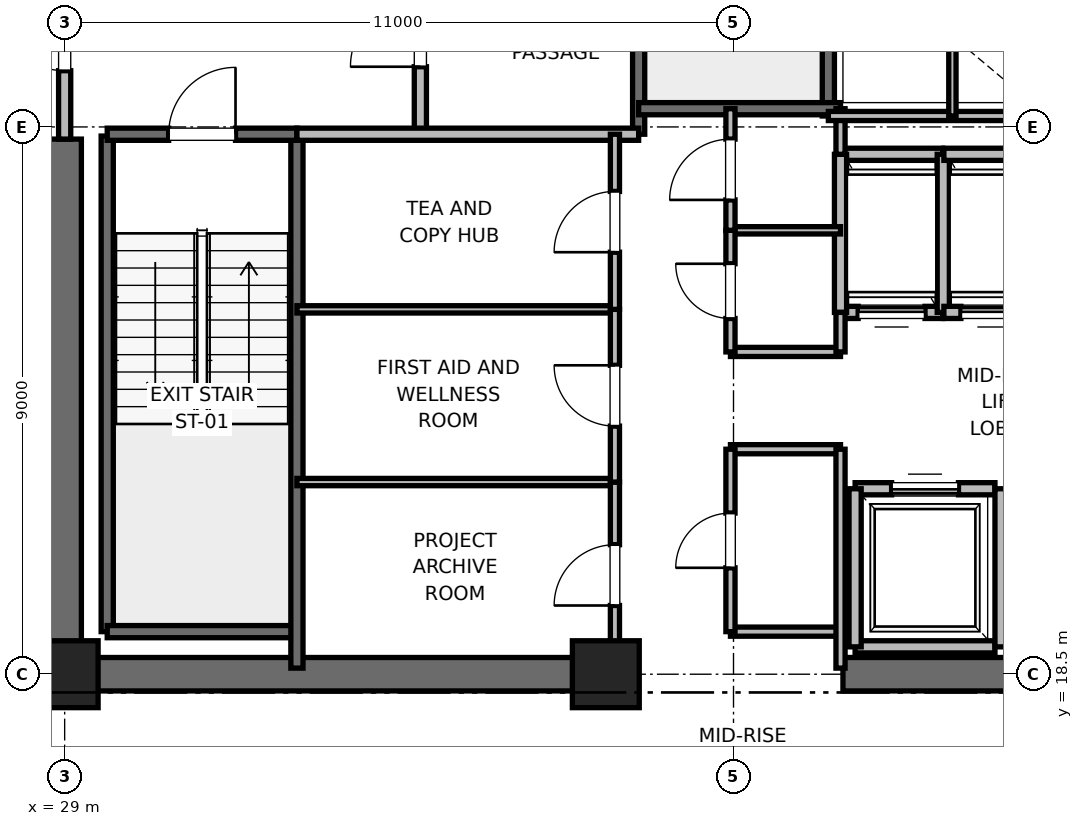
"""IFC4 building model, lengths in metres.
Left out: names, types, materials, properties, quantities, classifications, styles, units other than length and angle.
Written with IfcOpenShell. Run it as: python <this file> out.ifc"""

import sys

from ifc_helpers import new_model, si_unit, direction, frame, frame_2d, origin, origin_2d, place, context, subcontext, project, spatial, rectangle, extrude, element, fill, save


model = new_model("IFC4")
c1 = context("Model", 3, precision=1e-05, world=origin(), true_north=direction((0.0, 1.0)))
c2 = subcontext(c1, "Body", "Model", "MODEL_VIEW")
j1 = project(units=[si_unit("LENGTHUNIT", "METRE"), si_unit("PLANEANGLEUNIT", "RADIAN")], contexts=[c1])
p1 = place(None, origin())
s1 = spatial("IfcSite", under=j1, at=p1, CompositionType="ELEMENT")
p2 = place(p1, origin())
s2 = spatial("IfcBuilding", under=s1, at=p2, CompositionType="ELEMENT")
p3 = place(p2, frame((0.0, 0.0, 136.4)))
s3 = spatial("IfcBuildingStorey", under=s2, at=p3, CompositionType="ELEMENT", Elevation=136.4)
for number, where, z_axis, x_axis in (
    (1, (29.0, 18.5, 0.0), (0.0, 0.0, 1.0), (1.0, 0.0, 0.0)),
    (2, (37.9, 18.5, 0.0), (0.0, 0.0, 1.0), (1.0, 0.0, 0.0)),
):
    element("IfcColumn", number, at=place(p3, frame(where, z_axis=z_axis, x_axis=x_axis)), inside=s3, PredefinedType="PILASTER", context=c2, shape_type="SweptSolid", body=[
        extrude(rectangle(XDim=1.1, YDim=1.1, at=origin_2d()), origin(), (0.0, 0.0, 1.0), 4.0),
    ])
for number, where, z_axis, x_axis in (
    (3, (29.0, 18.5, 0.0), (0.0, 0.0, 1.0), (1.0, 0.0, 0.0)),
    (4, (41.8, 18.5, 0.0), (0.0, 0.0, 1.0), (1.0, 0.0, 0.0)),
):
    element("IfcWall", number, at=place(p3, frame(where, z_axis=z_axis, x_axis=x_axis)), inside=s3, PredefinedType="SHEAR", context=c2, shape_type="SweptSolid", body=[
        extrude(rectangle(XDim=9.2, YDim=0.55, at=frame_2d((4.6, 0.0))), origin(), (0.0, 0.0, 1.0), 3.775),
    ])
p4 = place(p3, frame((29.0, 18.5, 0.0), z_axis=(0.0, 0.0, 1.0), x_axis=(0.0, 1.0, 0.0)))
e5 = element("IfcWall", 5, at=p4, inside=s3, PredefinedType="SHEAR", context=c2, shape_type="SweptSolid", body=[
    extrude(rectangle(XDim=8.8, YDim=0.55, at=frame_2d((4.4, 0.0))), origin(), (0.0, 0.0, 1.0), 3.775),
])
p5 = place(p3, frame((29.7, 19.2, 0.0), z_axis=(0.0, 0.0, 1.0), x_axis=(0.0, 1.0, 0.0)))
e6 = element("IfcWall", 6, at=p5, inside=s3, PredefinedType="SOLIDWALL", context=c2, shape_type="SweptSolid", body=[
    extrude(rectangle(XDim=8.15, YDim=0.2, at=frame_2d((4.075, 0.0))), origin(), (0.0, 0.0, 1.0), 3.775),
])
p6 = place(p3, frame((29.7, 19.2, 0.0), z_axis=(0.0, 0.0, 1.0), x_axis=(1.0, 0.0, 0.0)))
e7 = element("IfcWall", 7, at=p6, inside=s3, PredefinedType="SOLIDWALL", context=c2, shape_type="SweptSolid", body=[
    extrude(rectangle(XDim=3.12, YDim=0.2, at=frame_2d((1.56, 0.0))), origin(), (0.0, 0.0, 1.0), 3.775),
])
p7 = place(p3, frame((32.82, 18.6, 0.0), z_axis=(0.0, 0.0, 1.0), x_axis=(0.0, 1.0, 0.0)))
e8 = element("IfcWall", 8, at=p7, inside=s3, PredefinedType="SOLIDWALL", context=c2, shape_type="SweptSolid", body=[
    extrude(rectangle(XDim=8.78, YDim=0.2, at=frame_2d((4.39, 0.0))), origin(), (0.0, 0.0, 1.0), 3.775),
])
p8 = place(p3, frame((29.7, 27.38, 0.0), z_axis=(0.0, 0.0, 1.0), x_axis=(1.0, 0.0, 0.0)))
e9 = element("IfcWall", 9, at=p8, inside=s3, PredefinedType="SOLIDWALL", context=c2, shape_type="SweptSolid", body=[
    extrude(rectangle(XDim=3.12, YDim=0.2, at=frame_2d((1.56, 0.0))), origin(), (0.0, 0.0, 1.0), 3.775),
])
p9 = place(p8, frame((1.01, 0.0, 0.0)))
e10 = element("IfcOpeningElement", 10, at=p9, cuts=e9, PredefinedType="OPENING", context=c2, shape_type="SweptSolid", body=[
    extrude(rectangle(XDim=1.1, YDim=2.15, at=frame_2d((0.55, 1.075))), frame((0.0, 0.1, 0.0), z_axis=(0.0, -1.0, 0.0), x_axis=(1.0, 0.0, 0.0)), (0.0, 0.0, 1.0), 0.2),
])
p10 = place(p3, frame((38.44, 27.38, 0.0), z_axis=(0.0, 0.0, 1.0), x_axis=(0.0, 1.0, 0.0)))
e11 = element("IfcWall", 11, at=p10, inside=s3, PredefinedType="SOLIDWALL", context=c2, shape_type="SweptSolid", body=[
    extrude(rectangle(XDim=8.87, YDim=0.2, at=frame_2d((4.435, 0.0))), origin(), (0.0, 0.0, 1.0), 3.775),
])
p11 = place(p3, frame((41.56, 27.68, 0.0), z_axis=(0.0, 0.0, 1.0), x_axis=(0.0, 1.0, 0.0)))
e12 = element("IfcWall", 12, at=p11, inside=s3, PredefinedType="SOLIDWALL", context=c2, shape_type="SweptSolid", body=[
    extrude(rectangle(XDim=8.57, YDim=0.2, at=frame_2d((4.285, 0.0))), origin(), (0.0, 0.0, 1.0), 3.775),
])
p12 = place(p3, frame((38.44, 27.8, 0.0), z_axis=(0.0, 0.0, 1.0), x_axis=(1.0, 0.0, 0.0)))
e13 = element("IfcWall", 13, at=p12, inside=s3, PredefinedType="SOLIDWALL", context=c2, shape_type="SweptSolid", body=[
    extrude(rectangle(XDim=3.32, YDim=0.2, at=frame_2d((1.66, 0.0))), origin(), (0.0, 0.0, 1.0), 3.775),
])
p13 = place(p3, frame((34.85, 27.38, 0.0), z_axis=(0.0, 0.0, 1.0), x_axis=(0.0, 1.0, 0.0)))
e14 = element("IfcWall", 14, at=p13, inside=s3, PredefinedType="PARTITIONING", context=c2, shape_type="SweptSolid", body=[
    extrude(rectangle(XDim=3.37, YDim=0.2, at=frame_2d((1.685, 0.0))), origin(), (0.0, 0.0, 1.0), 3.775),
])
p14 = place(p13, frame((1.11, 0.0, 0.0)))
e15 = element("IfcOpeningElement", 15, at=p14, cuts=e14, PredefinedType="OPENING", context=c2, shape_type="SweptSolid", body=[
    extrude(rectangle(XDim=1.15, YDim=2.2, at=frame_2d((0.575, 1.1))), frame((0.0, 0.1, 0.0), z_axis=(0.0, -1.0, 0.0), x_axis=(1.0, 0.0, 0.0)), (0.0, 0.0, 1.0), 0.2),
])
p15 = place(p3, frame((29.0, 27.3, 0.0), z_axis=(0.0, 0.0, 1.0), x_axis=(0.0, 1.0, 0.0)))
e16 = element("IfcWall", 16, at=p15, inside=s3, PredefinedType="PARTITIONING", context=c2, shape_type="SweptSolid", body=[
    extrude(rectangle(XDim=3.4, YDim=0.2, at=frame_2d((1.7, 0.0))), origin(), (0.0, 0.0, 1.0), 2.755),
])
p16 = place(p15, frame((1.125, 0.0, 0.0)))
e17 = element("IfcOpeningElement", 17, at=p16, cuts=e16, PredefinedType="OPENING", context=c2, shape_type="SweptSolid", body=[
    extrude(rectangle(XDim=1.15, YDim=2.2, at=frame_2d((0.575, 1.1))), frame((0.0, 0.1, 0.0), z_axis=(0.0, -1.0, 0.0), x_axis=(1.0, 0.0, 0.0)), (0.0, 0.0, 1.0), 0.2),
])
p17 = place(p3, frame((32.82, 27.38, 0.0), z_axis=(0.0, 0.0, 1.0), x_axis=(1.0, 0.0, 0.0)))
e18 = element("IfcWall", 18, at=p17, inside=s3, PredefinedType="PARTITIONING", context=c2, shape_type="SweptSolid", body=[
    extrude(rectangle(XDim=5.62, YDim=0.2, at=frame_2d((2.81, 0.0))), origin(), (0.0, 0.0, 1.0), 3.775),
])
p18 = place(p3, frame((42.0, 18.95, 0.0), z_axis=(0.0, 0.0, 1.0), x_axis=(1.0, 0.0, 0.0)))
e19 = element("IfcWall", 19, at=p18, inside=s3, PredefinedType="SOLIDWALL", context=c2, shape_type="SweptSolid", body=[
    extrude(rectangle(XDim=2.3, YDim=0.2, at=frame_2d((1.15, 0.0))), origin(), (0.0, 0.0, 1.0), 2.755),
])
p19 = place(p3, frame((44.3, 21.55, 0.0), z_axis=(0.0, 0.0, 1.0), x_axis=(-1.0, 0.0, 0.0)))
e20 = element("IfcWall", 20, at=p19, inside=s3, PredefinedType="SOLIDWALL", context=c2, shape_type="SweptSolid", body=[
    extrude(rectangle(XDim=2.3, YDim=0.2, at=frame_2d((1.15, 0.0))), origin(), (0.0, 0.0, 1.0), 3.775),
])
p20 = place(p19, frame((0.6, 0.0, 0.0)))
e21 = element("IfcOpeningElement", 21, at=p20, cuts=e20, PredefinedType="OPENING", context=c2, shape_type="SweptSolid", body=[
    extrude(rectangle(XDim=1.1, YDim=2.2, at=frame_2d((0.55, 1.1))), frame((0.0, 0.1, 0.0), z_axis=(0.0, -1.0, 0.0), x_axis=(1.0, 0.0, 0.0)), (0.0, 0.0, 1.0), 0.2),
])
p21 = place(p3, frame((42.0, 21.55, 0.0), z_axis=(0.0, 0.0, 1.0), x_axis=(0.0, -1.0, 0.0)))
e22 = element("IfcWall", 22, at=p21, inside=s3, PredefinedType="SOLIDWALL", context=c2, shape_type="SweptSolid", body=[
    extrude(rectangle(XDim=2.6, YDim=0.2, at=frame_2d((1.3, 0.0))), origin(), (0.0, 0.0, 1.0), 2.755),
])
p22 = place(p3, frame((44.4, 18.95, 0.0), z_axis=(0.0, 0.0, 1.0), x_axis=(0.0, 1.0, 0.0)))
e23 = element("IfcWall", 23, at=p22, inside=s3, PredefinedType="SOLIDWALL", context=c2, shape_type="SweptSolid", body=[
    extrude(rectangle(XDim=2.6, YDim=0.2, at=frame_2d((1.3, 0.0))), origin(), (0.0, 0.0, 1.0), 3.775),
])
p23 = place(p3, frame((41.76, 24.45, 0.0), z_axis=(0.0, 0.0, 1.0), x_axis=(1.0, 0.0, 0.0)))
e24 = element("IfcWall", 24, at=p23, inside=s3, PredefinedType="SOLIDWALL", context=c2, shape_type="SweptSolid", body=[
    extrude(rectangle(XDim=1.68, YDim=0.2, at=frame_2d((0.84, 0.0))), origin(), (0.0, 0.0, 1.0), 3.775),
])
p24 = place(p23, frame((0.29, 0.0, 0.0)))
e25 = element("IfcOpeningElement", 25, at=p24, cuts=e24, PredefinedType="OPENING", context=c2, shape_type="SweptSolid", body=[
    extrude(rectangle(XDim=1.1, YDim=2.2, at=frame_2d((0.55, 1.1))), frame((0.0, 0.1, 0.0), z_axis=(0.0, -1.0, 0.0), x_axis=(1.0, 0.0, 0.0)), (0.0, 0.0, 1.0), 0.2),
])
p25 = place(p3, frame((43.44, 27.05, 0.0), z_axis=(0.0, 0.0, 1.0), x_axis=(-1.0, 0.0, 0.0)))
e26 = element("IfcWall", 26, at=p25, inside=s3, PredefinedType="SOLIDWALL", context=c2, shape_type="SweptSolid", body=[
    extrude(rectangle(XDim=1.68, YDim=0.2, at=frame_2d((0.84, 0.0))), origin(), (0.0, 0.0, 1.0), 3.775),
])
for number, where, z_axis, x_axis in (
    (27, (41.76, 27.05, 0.0), (0.0, 0.0, 1.0), (0.0, -1.0, 0.0)),
    (28, (43.45, 24.45, 0.0), (0.0, 0.0, 1.0), (0.0, 1.0, 0.0)),
):
    element("IfcWall", number, at=place(p3, frame(where, z_axis=z_axis, x_axis=x_axis)), inside=s3, PredefinedType="SOLIDWALL", context=c2, shape_type="SweptSolid", body=[
        extrude(rectangle(XDim=2.6, YDim=0.2, at=frame_2d((1.3, 0.0))), origin(), (0.0, 0.0, 1.0), 3.775),
    ])
p26 = place(p3, frame((43.46, 24.45, 0.0), z_axis=(0.0, 0.0, 1.0), x_axis=(1.0, 0.0, 0.0)))
e29 = element("IfcWall", 29, at=p26, inside=s3, PredefinedType="SOLIDWALL", context=c2, shape_type="SweptSolid", body=[
    extrude(rectangle(XDim=1.66, YDim=0.2, at=frame_2d((0.83, 0.0))), origin(), (0.0, 0.0, 1.0), 3.775),
])
p27 = place(p26, frame((0.28, 0.0, 0.0)))
e30 = element("IfcOpeningElement", 30, at=p27, cuts=e29, PredefinedType="OPENING", context=c2, shape_type="SweptSolid", body=[
    extrude(rectangle(XDim=1.1, YDim=2.2, at=frame_2d((0.55, 1.1))), frame((0.0, 0.1, 0.0), z_axis=(0.0, -1.0, 0.0), x_axis=(1.0, 0.0, 0.0)), (0.0, 0.0, 1.0), 0.2),
])
p28 = place(p3, frame((45.12, 27.05, 0.0), z_axis=(0.0, 0.0, 1.0), x_axis=(-1.0, 0.0, 0.0)))
e31 = element("IfcWall", 31, at=p28, inside=s3, PredefinedType="SOLIDWALL", context=c2, shape_type="SweptSolid", body=[
    extrude(rectangle(XDim=1.66, YDim=0.2, at=frame_2d((0.83, 0.0))), origin(), (0.0, 0.0, 1.0), 3.775),
])
for number, where, z_axis, x_axis in (
    (32, (39.95, 19.2, 0.0), (0.0, 0.0, 1.0), (1.0, 0.0, 0.0)),
    (33, (39.95, 22.2, 0.0), (0.0, 0.0, 1.0), (1.0, 0.0, 0.0)),
    (34, (39.95, 23.8, 0.0), (0.0, 0.0, 1.0), (1.0, 0.0, 0.0)),
):
    element("IfcWall", number, at=place(p3, frame(where, z_axis=z_axis, x_axis=x_axis)), inside=s3, PredefinedType="PARTITIONING", context=c2, shape_type="SweptSolid", body=[
        extrude(rectangle(XDim=1.81, YDim=0.15, at=frame_2d((0.905, 0.0))), origin(), (0.0, 0.0, 1.0), 2.85),
    ])
p29 = place(p3, frame((39.95, 25.8, 0.0), z_axis=(0.0, 0.0, 1.0), x_axis=(1.0, 0.0, 0.0)))
e35 = element("IfcWall", 35, at=p29, inside=s3, PredefinedType="PARTITIONING", context=c2, shape_type="SweptSolid", body=[
    extrude(rectangle(XDim=1.81, YDim=0.12, at=frame_2d((0.905, 0.0))), origin(), (0.0, 0.0, 1.0), 2.85),
])
p30 = place(p3, frame((41.76, 18.6, 0.0), z_axis=(0.0, 0.0, 1.0), x_axis=(0.0, 1.0, 0.0)))
e36 = element("IfcWall", 36, at=p30, inside=s3, PredefinedType="PARTITIONING", context=c2, shape_type="SweptSolid", body=[
    extrude(rectangle(XDim=3.6, YDim=0.15, at=frame_2d((1.8, 0.0))), origin(), (0.0, 0.0, 1.0), 2.755),
])
p31 = place(p3, frame((41.76, 23.8, 0.0), z_axis=(0.0, 0.0, 1.0), x_axis=(0.0, 1.0, 0.0)))
e37 = element("IfcWall", 37, at=p31, inside=s3, PredefinedType="PARTITIONING", context=c2, shape_type="SweptSolid", body=[
    extrude(rectangle(XDim=0.65, YDim=0.15, at=frame_2d((0.325, 0.0))), origin(), (0.0, 0.0, 1.0), 2.85),
])
p32 = place(p3, frame((41.76, 27.05, 0.0), z_axis=(0.0, 0.0, 1.0), x_axis=(0.0, 1.0, 0.0)))
e38 = element("IfcWall", 38, at=p32, inside=s3, PredefinedType="PARTITIONING", context=c2, shape_type="SweptSolid", body=[
    extrude(rectangle(XDim=0.75, YDim=0.15, at=frame_2d((0.375, 0.0))), origin(), (0.0, 0.0, 1.0), 2.85),
])
p33 = place(p3, frame((39.95, 19.2, 0.0), z_axis=(0.0, 0.0, 1.0), x_axis=(0.0, 1.0, 0.0)))
e39 = element("IfcWall", 39, at=p33, inside=s3, PredefinedType="PARTITIONING", context=c2, shape_type="SweptSolid", body=[
    extrude(rectangle(XDim=3.0, YDim=0.15, at=frame_2d((1.5, 0.0))), origin(), (0.0, 0.0, 1.0), 2.85),
])
p34 = place(p33, frame((1.05, 0.0, 0.0)))
e40 = element("IfcOpeningElement", 40, at=p34, cuts=e39, PredefinedType="OPENING", context=c2, shape_type="SweptSolid", body=[
    extrude(rectangle(XDim=0.9, YDim=2.1, at=frame_2d((0.45, 1.05))), frame((0.0, 0.075, 0.0), z_axis=(0.0, -1.0, 0.0), x_axis=(1.0, 0.0, 0.0)), (0.0, 0.0, 1.0), 0.15),
])
p35 = place(p3, frame((39.95, 23.8, 0.0), z_axis=(0.0, 0.0, 1.0), x_axis=(0.0, 1.0, 0.0)))
e41 = element("IfcWall", 41, at=p35, inside=s3, PredefinedType="PARTITIONING", context=c2, shape_type="SweptSolid", body=[
    extrude(rectangle(XDim=2.0, YDim=0.15, at=frame_2d((1.0, 0.0))), origin(), (0.0, 0.0, 1.0), 2.85),
])
p36 = place(p35, frame((0.55, 0.0, 0.0)))
e42 = element("IfcOpeningElement", 42, at=p36, cuts=e41, PredefinedType="OPENING", context=c2, shape_type="SweptSolid", body=[
    extrude(rectangle(XDim=0.9, YDim=2.1, at=frame_2d((0.45, 1.05))), frame((0.0, 0.075, 0.0), z_axis=(0.0, -1.0, 0.0), x_axis=(1.0, 0.0, 0.0)), (0.0, 0.0, 1.0), 0.15),
])
p37 = place(p3, frame((39.95, 25.8, 0.0), z_axis=(0.0, 0.0, 1.0), x_axis=(0.0, 1.0, 0.0)))
e43 = element("IfcWall", 43, at=p37, inside=s3, PredefinedType="PARTITIONING", context=c2, shape_type="SweptSolid", body=[
    extrude(rectangle(XDim=2.0, YDim=0.15, at=frame_2d((1.0, 0.0))), origin(), (0.0, 0.0, 1.0), 2.85),
])
p38 = place(p37, frame((0.5, 0.0, 0.0)))
e44 = element("IfcOpeningElement", 44, at=p38, cuts=e43, PredefinedType="OPENING", context=c2, shape_type="SweptSolid", body=[
    extrude(rectangle(XDim=1.0, YDim=2.15, at=frame_2d((0.5, 1.075))), frame((0.0, 0.075, 0.0), z_axis=(0.0, -1.0, 0.0), x_axis=(1.0, 0.0, 0.0)), (0.0, 0.0, 1.0), 0.15),
])
for number, where, z_axis, x_axis in (
    (45, (32.82, 21.66, 0.0), (0.0, 0.0, 1.0), (1.0, 0.0, 0.0)),
    (46, (32.82, 24.5, 0.0), (0.0, 0.0, 1.0), (1.0, 0.0, 0.0)),
):
    element("IfcWall", number, at=place(p3, frame(where, z_axis=z_axis, x_axis=x_axis)), inside=s3, PredefinedType="PARTITIONING", context=c2, shape_type="SweptSolid", body=[
        extrude(rectangle(XDim=5.23, YDim=0.12, at=frame_2d((2.615, 0.0))), origin(), (0.0, 0.0, 1.0), 2.85),
    ])
p39 = place(p3, frame((38.05, 18.6, 0.0), z_axis=(0.0, 0.0, 1.0), x_axis=(0.0, 1.0, 0.0)))
e47 = element("IfcWall", 47, at=p39, inside=s3, PredefinedType="PARTITIONING", context=c2, shape_type="SweptSolid", body=[
    extrude(rectangle(XDim=3.06, YDim=0.15, at=frame_2d((1.53, 0.0))), origin(), (0.0, 0.0, 1.0), 2.755),
])
p40 = place(p39, frame((1.03, 0.0, 0.0)))
e48 = element("IfcOpeningElement", 48, at=p40, cuts=e47, PredefinedType="OPENING", context=c2, shape_type="SweptSolid", body=[
    extrude(rectangle(XDim=1.0, YDim=2.15, at=frame_2d((0.5, 1.075))), frame((0.0, 0.075, 0.0), z_axis=(0.0, -1.0, 0.0), x_axis=(1.0, 0.0, 0.0)), (0.0, 0.0, 1.0), 0.15),
])
p41 = place(p3, frame((38.05, 21.66, 0.0), z_axis=(0.0, 0.0, 1.0), x_axis=(0.0, 1.0, 0.0)))
e49 = element("IfcWall", 49, at=p41, inside=s3, PredefinedType="PARTITIONING", context=c2, shape_type="SweptSolid", body=[
    extrude(rectangle(XDim=2.84, YDim=0.15, at=frame_2d((1.42, 0.0))), origin(), (0.0, 0.0, 1.0), 2.85),
])
p42 = place(p41, frame((0.92, 0.0, 0.0)))
e50 = element("IfcOpeningElement", 50, at=p42, cuts=e49, PredefinedType="OPENING", context=c2, shape_type="SweptSolid", body=[
    extrude(rectangle(XDim=1.0, YDim=2.15, at=frame_2d((0.5, 1.075))), frame((0.0, 0.075, 0.0), z_axis=(0.0, -1.0, 0.0), x_axis=(1.0, 0.0, 0.0)), (0.0, 0.0, 1.0), 0.15),
])
p43 = place(p3, frame((38.05, 24.5, 0.0), z_axis=(0.0, 0.0, 1.0), x_axis=(0.0, 1.0, 0.0)))
e51 = element("IfcWall", 51, at=p43, inside=s3, PredefinedType="PARTITIONING", context=c2, shape_type="SweptSolid", body=[
    extrude(rectangle(XDim=2.88, YDim=0.15, at=frame_2d((1.44, 0.0))), origin(), (0.0, 0.0, 1.0), 2.85),
])
p44 = place(p43, frame((0.94, 0.0, 0.0)))
e52 = element("IfcOpeningElement", 52, at=p44, cuts=e51, PredefinedType="OPENING", context=c2, shape_type="SweptSolid", body=[
    extrude(rectangle(XDim=1.0, YDim=2.15, at=frame_2d((0.5, 1.075))), frame((0.0, 0.075, 0.0), z_axis=(0.0, -1.0, 0.0), x_axis=(1.0, 0.0, 0.0)), (0.0, 0.0, 1.0), 0.15),
])
p45 = place(p3, frame((41.56, 27.68, 0.0), z_axis=(0.0, 0.0, 1.0), x_axis=(1.0, 0.0, 0.0)))
e53 = element("IfcWall", 53, at=p45, inside=s3, PredefinedType="PARTITIONING", context=c2, shape_type="SweptSolid", body=[
    extrude(rectangle(XDim=3.59, YDim=0.15, at=frame_2d((1.795, 0.0))), origin(), (0.0, 0.0, 1.0), 2.85),
])
p46 = place(p3, frame((43.6, 27.68, 0.0), z_axis=(0.0, 0.0, 1.0), x_axis=(0.0, 1.0, 0.0)))
e54 = element("IfcWall", 54, at=p46, inside=s3, PredefinedType="PARTITIONING", context=c2, shape_type="SweptSolid", body=[
    extrude(rectangle(XDim=3.04, YDim=0.12, at=frame_2d((1.52, 0.0))), origin(), (0.0, 0.0, 1.0), 2.85),
])
p47 = place(p9, origin())
e55 = element("IfcDoor", 55, at=p47, inside=s3, OperationType="SINGLE_SWING_RIGHT", PredefinedType="DOOR", context=c2, shape_type="SweptSolid", body=[
    extrude(rectangle(XDim=1.1, YDim=2.15, at=frame_2d((0.55, 1.075))), frame((0.0, 0.025, 0.0), z_axis=(0.0, -1.0, 0.0), x_axis=(1.0, 0.0, 0.0)), (0.0, 0.0, 1.0), 0.05),
])
fill(e10, e55)
p48 = place(p14, origin())
e56 = element("IfcDoor", 56, at=p48, inside=s3, OperationType="SINGLE_SWING_LEFT", PredefinedType="DOOR", context=c2, shape_type="SweptSolid", body=[
    extrude(rectangle(XDim=1.15, YDim=2.2, at=frame_2d((0.575, 1.1))), frame((0.0, 0.025, 0.0), z_axis=(0.0, -1.0, 0.0), x_axis=(1.0, 0.0, 0.0)), (0.0, 0.0, 1.0), 0.05),
])
fill(e15, e56)
p49 = place(p16, origin())
e57 = element("IfcDoor", 57, at=p49, inside=s3, OperationType="SINGLE_SWING_RIGHT", PredefinedType="DOOR", context=c2, shape_type="SweptSolid", body=[
    extrude(rectangle(XDim=1.15, YDim=2.2, at=frame_2d((0.575, 1.1))), frame((0.0, 0.025, 0.0), z_axis=(0.0, -1.0, 0.0), x_axis=(1.0, 0.0, 0.0)), (0.0, 0.0, 1.0), 0.05),
])
fill(e17, e57)
p50 = place(p20, origin())
e58 = element("IfcDoor", 58, at=p50, inside=s3, OperationType="SLIDING_TO_RIGHT", PredefinedType="DOOR", context=c2, shape_type="SweptSolid", body=[
    extrude(rectangle(XDim=1.1, YDim=2.2, at=frame_2d((0.55, 1.1))), frame((0.0, 0.025, 0.0), z_axis=(0.0, -1.0, 0.0), x_axis=(1.0, 0.0, 0.0)), (0.0, 0.0, 1.0), 0.05),
])
fill(e21, e58)
p51 = place(p24, origin())
e59 = element("IfcDoor", 59, at=p51, inside=s3, OperationType="SLIDING_TO_RIGHT", PredefinedType="DOOR", context=c2, shape_type="SweptSolid", body=[
    extrude(rectangle(XDim=1.1, YDim=2.2, at=frame_2d((0.55, 1.1))), frame((0.0, 0.025, 0.0), z_axis=(0.0, -1.0, 0.0), x_axis=(1.0, 0.0, 0.0)), (0.0, 0.0, 1.0), 0.05),
])
fill(e25, e59)
p52 = place(p27, origin())
e60 = element("IfcDoor", 60, at=p52, inside=s3, OperationType="SLIDING_TO_RIGHT", PredefinedType="DOOR", context=c2, shape_type="SweptSolid", body=[
    extrude(rectangle(XDim=1.1, YDim=2.2, at=frame_2d((0.55, 1.1))), frame((0.0, 0.025, 0.0), z_axis=(0.0, -1.0, 0.0), x_axis=(1.0, 0.0, 0.0)), (0.0, 0.0, 1.0), 0.05),
])
fill(e30, e60)
p53 = place(p34, origin())
e61 = element("IfcDoor", 61, at=p53, inside=s3, OperationType="SINGLE_SWING_LEFT", PredefinedType="DOOR", context=c2, shape_type="SweptSolid", body=[
    extrude(rectangle(XDim=0.9, YDim=2.1, at=frame_2d((0.45, 1.05))), frame((0.0, 0.025, 0.0), z_axis=(0.0, -1.0, 0.0), x_axis=(1.0, 0.0, 0.0)), (0.0, 0.0, 1.0), 0.05),
])
fill(e40, e61)
p54 = place(p36, origin())
e62 = element("IfcDoor", 62, at=p54, inside=s3, OperationType="SINGLE_SWING_RIGHT", PredefinedType="DOOR", context=c2, shape_type="SweptSolid", body=[
    extrude(rectangle(XDim=0.9, YDim=2.1, at=frame_2d((0.45, 1.05))), frame((0.0, 0.025, 0.0), z_axis=(0.0, -1.0, 0.0), x_axis=(1.0, 0.0, 0.0)), (0.0, 0.0, 1.0), 0.05),
])
fill(e42, e62)
p55 = place(p38, origin())
e63 = element("IfcDoor", 63, at=p55, inside=s3, OperationType="SINGLE_SWING_LEFT", PredefinedType="DOOR", context=c2, shape_type="SweptSolid", body=[
    extrude(rectangle(XDim=1.0, YDim=2.15, at=frame_2d((0.5, 1.075))), frame((0.0, 0.025, 0.0), z_axis=(0.0, -1.0, 0.0), x_axis=(1.0, 0.0, 0.0)), (0.0, 0.0, 1.0), 0.05),
])
fill(e44, e63)
p56 = place(p40, origin())
e64 = element("IfcDoor", 64, at=p56, inside=s3, OperationType="SINGLE_SWING_LEFT", PredefinedType="DOOR", context=c2, shape_type="SweptSolid", body=[
    extrude(rectangle(XDim=1.0, YDim=2.15, at=frame_2d((0.5, 1.075))), frame((0.0, 0.025, 0.0), z_axis=(0.0, -1.0, 0.0), x_axis=(1.0, 0.0, 0.0)), (0.0, 0.0, 1.0), 0.05),
])
fill(e48, e64)
p57 = place(p42, origin())
e65 = element("IfcDoor", 65, at=p57, inside=s3, OperationType="SINGLE_SWING_RIGHT", PredefinedType="DOOR", context=c2, shape_type="SweptSolid", body=[
    extrude(rectangle(XDim=1.0, YDim=2.15, at=frame_2d((0.5, 1.075))), frame((0.0, 0.025, 0.0), z_axis=(0.0, -1.0, 0.0), x_axis=(1.0, 0.0, 0.0)), (0.0, 0.0, 1.0), 0.05),
])
fill(e50, e65)
p58 = place(p44, origin())
e66 = element("IfcDoor", 66, at=p58, inside=s3, OperationType="SINGLE_SWING_LEFT", PredefinedType="DOOR", context=c2, shape_type="SweptSolid", body=[
    extrude(rectangle(XDim=1.0, YDim=2.15, at=frame_2d((0.5, 1.075))), frame((0.0, 0.025, 0.0), z_axis=(0.0, -1.0, 0.0), x_axis=(1.0, 0.0, 0.0)), (0.0, 0.0, 1.0), 0.05),
])
fill(e52, e66)
save(model, sys.argv[1])
